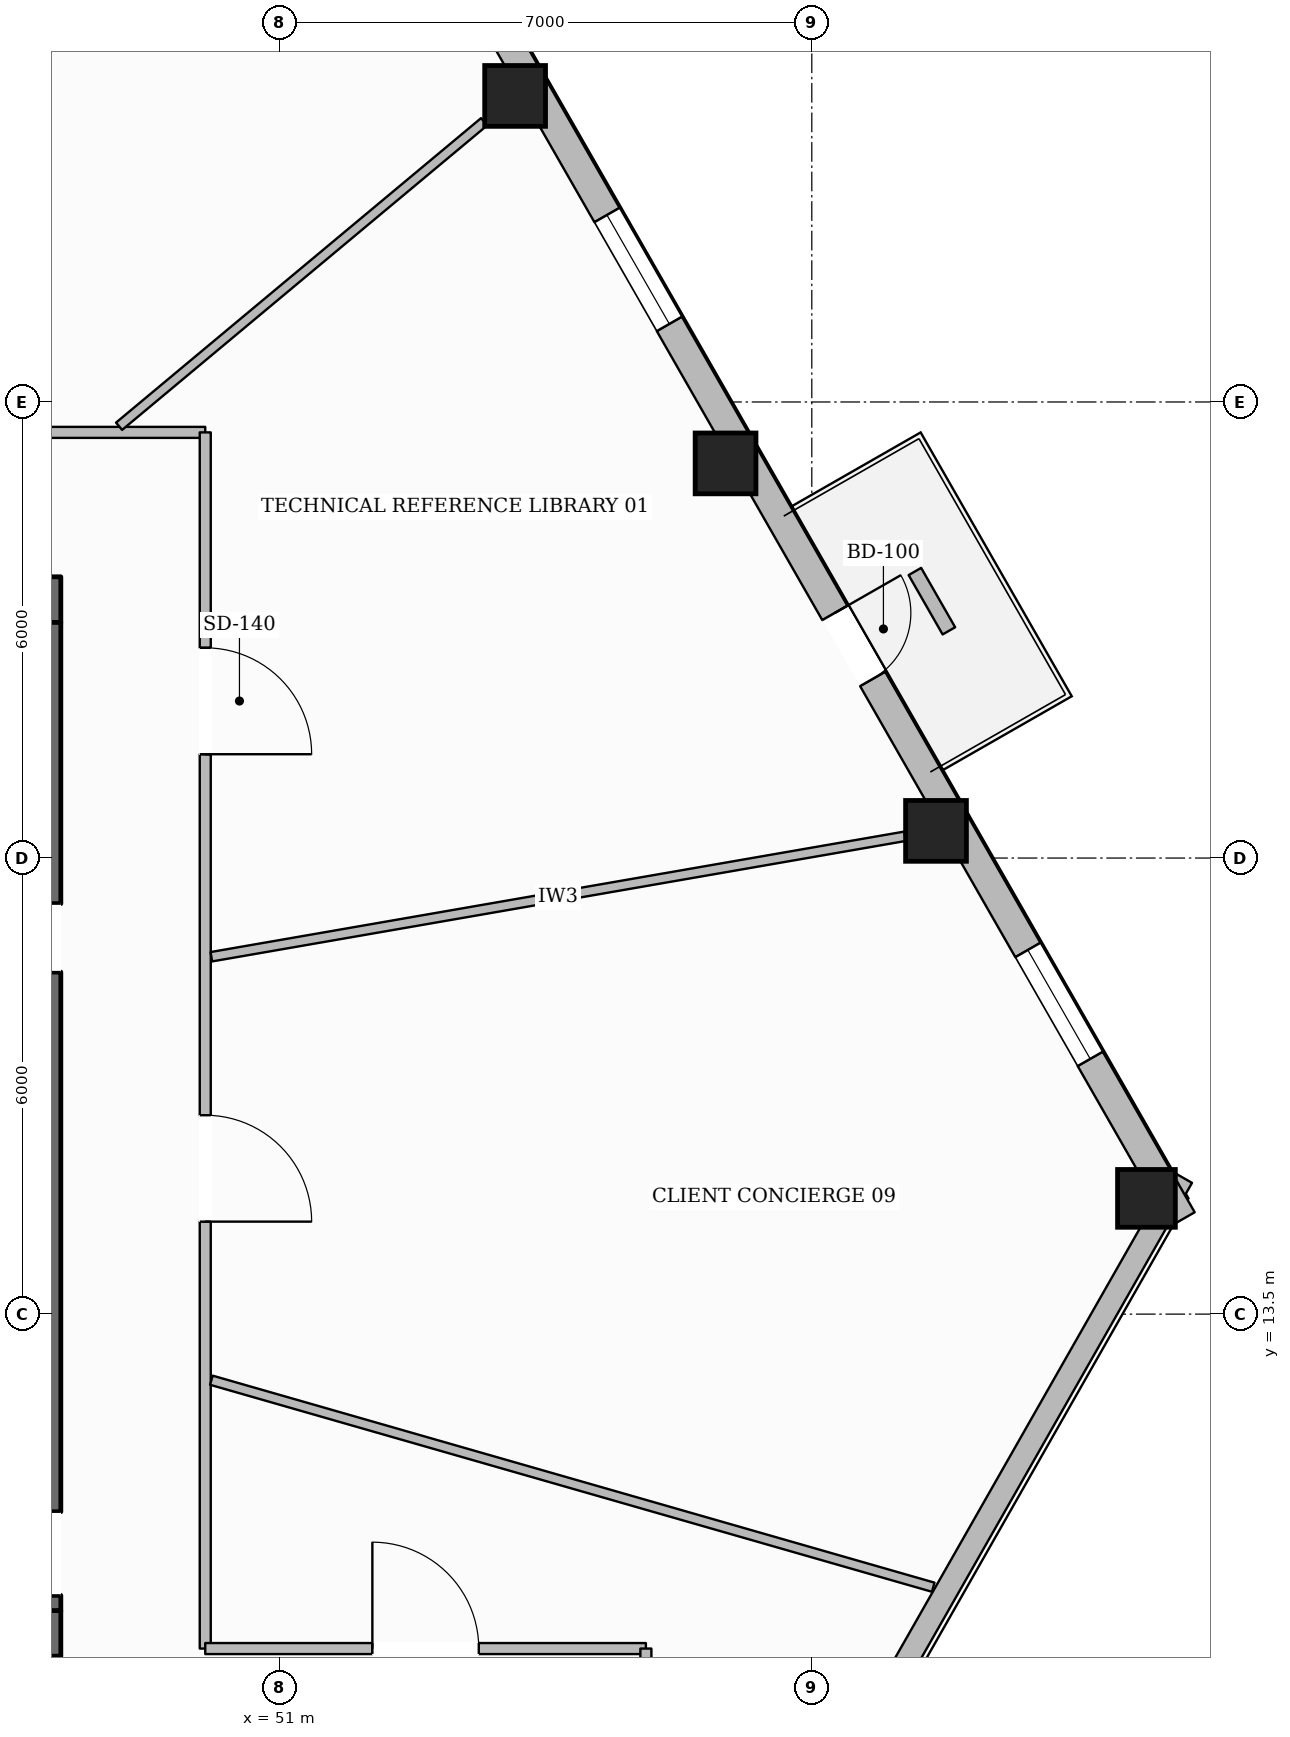
"""IFC4 building model, lengths in metres.
Left out: names, types, materials, properties, quantities, classifications, styles, units other than length and angle.
Written with IfcOpenShell. Run it as: python <this file> out.ifc"""

import sys

from ifc_helpers import new_model, si_unit, direction, frame, frame_2d, origin, origin_2d, place, context, subcontext, project, spatial, rectangle, hollow_rectangle, extrude, element, fill, save


model = new_model("IFC4")
c1 = context("Model", 3, precision=1e-05, world=origin(), true_north=direction((0.0, 1.0)))
c2 = subcontext(c1, "Body", "Model", "MODEL_VIEW")
j1 = project(units=[si_unit("LENGTHUNIT", "METRE"), si_unit("PLANEANGLEUNIT", "RADIAN")], contexts=[c1])
p1 = place(None, origin())
s1 = spatial("IfcSite", under=j1, at=p1, CompositionType="ELEMENT")
p2 = place(p1, origin())
s2 = spatial("IfcBuilding", under=s1, at=p2, CompositionType="ELEMENT")
p3 = place(p2, frame((0.0, 0.0, 32.95)))
s3 = spatial("IfcBuildingStorey", under=s2, at=p3, CompositionType="ELEMENT", Elevation=32.95)
p4 = place(p3, frame((27.88, 9.3, 0.0), z_axis=(0.0, 0.0, 1.0), x_axis=(1.0, 0.0, 0.0)))
e1 = element("IfcWall", 1, at=p4, inside=s3, PredefinedType="SOLIDWALL", context=c2, shape_type="SweptSolid", body=[
    extrude(rectangle(XDim=20.24, YDim=0.6, at=frame_2d((10.12, 0.0))), origin(), (0.0, 0.0, 1.0), 3.59),
])
p5 = place(p4, frame((10.62, 0.0, 0.0)))
e2 = element("IfcOpeningElement", 2, at=p5, cuts=e1, PredefinedType="OPENING", context=c2, shape_type="SweptSolid", body=[
    extrude(rectangle(XDim=1.4, YDim=2.2, at=frame_2d((0.7, 1.1))), frame((0.0, 0.31, 0.0), z_axis=(0.0, -1.0, 0.0), x_axis=(1.0, 0.0, 0.0)), (0.0, 0.0, 1.0), 0.62),
])
p6 = place(p3, frame((27.88, 22.9, 0.0), z_axis=(0.0, 0.0, 1.0), x_axis=(1.0, 0.0, 0.0)))
e3 = element("IfcWall", 3, at=p6, inside=s3, PredefinedType="SOLIDWALL", context=c2, shape_type="SweptSolid", body=[
    extrude(rectangle(XDim=20.24, YDim=0.6, at=frame_2d((10.12, 0.0))), origin(), (0.0, 0.0, 1.0), 3.59),
])
p7 = place(p6, frame((6.395, 0.0, 0.0)))
e4 = element("IfcOpeningElement", 4, at=p7, cuts=e3, PredefinedType="OPENING", context=c2, shape_type="SweptSolid", body=[
    extrude(rectangle(XDim=1.05, YDim=2.15, at=frame_2d((0.525, 1.075))), frame((0.0, 0.31, 0.0), z_axis=(0.0, -1.0, 0.0), x_axis=(1.0, 0.0, 0.0)), (0.0, 0.0, 1.0), 0.62),
])
p8 = place(p6, frame((12.795, 0.0, 0.0)))
e5 = element("IfcOpeningElement", 5, at=p8, cuts=e3, PredefinedType="OPENING", context=c2, shape_type="SweptSolid", body=[
    extrude(rectangle(XDim=1.05, YDim=2.15, at=frame_2d((0.525, 1.075))), frame((0.0, 0.31, 0.0), z_axis=(0.0, -1.0, 0.0), x_axis=(1.0, 0.0, 0.0)), (0.0, 0.0, 1.0), 0.62),
])
p9 = place(p3, frame((47.82, 9.6, 0.0), z_axis=(0.0, 0.0, 1.0), x_axis=(0.0, 1.0, 0.0)))
e6 = element("IfcWall", 6, at=p9, inside=s3, PredefinedType="SOLIDWALL", context=c2, shape_type="SweptSolid", body=[
    extrude(rectangle(XDim=13.0, YDim=0.6, at=frame_2d((6.5, 0.0))), origin(), (0.0, 0.0, 1.0), 3.59),
])
p10 = place(p9, frame((0.2, 0.0, 0.0)))
e7 = element("IfcOpeningElement", 7, at=p10, cuts=e6, PredefinedType="OPENING", context=c2, shape_type="SweptSolid", body=[
    extrude(rectangle(XDim=1.1, YDim=2.15, at=frame_2d((0.55, 1.075))), frame((0.0, 0.31, 0.0), z_axis=(0.0, -1.0, 0.0), x_axis=(1.0, 0.0, 0.0)), (0.0, 0.0, 1.0), 0.62),
])
p11 = place(p9, frame((8.4, 0.0, 0.0)))
e8 = element("IfcOpeningElement", 8, at=p11, cuts=e6, PredefinedType="OPENING", context=c2, shape_type="SweptSolid", body=[
    extrude(rectangle(XDim=0.9, YDim=2.1, at=frame_2d((0.45, 1.05))), frame((0.0, 0.31, 0.0), z_axis=(0.0, -1.0, 0.0), x_axis=(1.0, 0.0, 0.0)), (0.0, 0.0, 1.0), 0.62),
])
p12 = place(p3, frame((62.403, 15.023, 0.0), z_axis=(0.0, 0.0, 1.0), x_axis=(1.0, 0.0, 0.0)))
e9 = element("IfcColumn", 9, at=p12, inside=s3, PredefinedType="COLUMN", context=c2, shape_type="SweptSolid", body=[
    extrude(hollow_rectangle(XDim=0.76, YDim=0.76, WallThickness=0.035, at=origin_2d()), origin(), (0.0, 0.0, 1.0), 3.59),
])
for number, where, z_axis, x_axis in (
    (10, (59.634, 19.857, 0.0), (0.0, 0.0, 1.0), (1.0, 0.0, 0.0)),
    (11, (56.865, 24.692, 0.0), (0.0, 0.0, 1.0), (1.0, 0.0, 0.0)),
    (12, (54.097, 29.526, 0.0), (0.0, 0.0, 1.0), (1.0, 0.0, 0.0)),
):
    element("IfcColumn", number, at=place(p3, frame(where, z_axis=z_axis, x_axis=x_axis)), inside=s3, PredefinedType="COLUMN", context=c2, shape_type="SweptSolid", body=[
        extrude(hollow_rectangle(XDim=0.8, YDim=0.8, WallThickness=0.036, at=origin_2d()), origin(), (0.0, 0.0, 1.0), 3.59),
    ])
p13 = place(p3, frame((62.872, 15.301, 0.0), z_axis=(0.0, 0.0, 1.0), x_axis=(-0.495028156912, -0.868876932519, 0.0)))
e13 = element("IfcWall", 13, at=p13, inside=s3, PredefinedType="STANDARD", context=c2, shape_type="SweptSolid", body=[
    extrude(rectangle(XDim=16.575, YDim=0.3, at=frame_2d((8.288, 0.0))), origin(), (0.0, 0.0, 1.0), 2.97),
])
p14 = place(p13, frame((7.688, 0.0, 0.65)))
e14 = element("IfcOpeningElement", 14, at=p14, cuts=e13, PredefinedType="OPENING", context=c2, shape_type="SweptSolid", body=[
    extrude(rectangle(XDim=1.2, YDim=1.7, at=frame_2d((0.6, 0.85))), frame((0.0, 0.16, 0.0), z_axis=(0.0, -1.0, 0.0), x_axis=(1.0, 0.0, 0.0)), (0.0, 0.0, 1.0), 0.32),
])
p15 = place(p3, frame((45.788, 44.579, 0.0), z_axis=(0.0, 0.0, 1.0), x_axis=(0.49695855075, -0.867774278736, 0.0)))
e15 = element("IfcWall", 15, at=p15, inside=s3, PredefinedType="STANDARD", context=c2, shape_type="SweptSolid", body=[
    extrude(rectangle(XDim=34.379, YDim=0.38, at=frame_2d((17.189, 0.0))), origin(), (0.0, 0.0, 1.0), 2.97),
])
p16 = place(p15, frame((25.184, 0.0, 0.0)))
e16 = element("IfcOpeningElement", 16, at=p16, cuts=e15, PredefinedType="OPENING", context=c2, shape_type="SweptSolid", body=[
    extrude(rectangle(XDim=1.0, YDim=2.2, at=frame_2d((0.5, 1.1))), frame((0.0, 0.2, 0.0), z_axis=(0.0, -1.0, 0.0), x_axis=(1.0, 0.0, 0.0)), (0.0, 0.0, 1.0), 0.4),
])
p17 = place(p15, frame((30.294, 0.0, 0.65)))
e17 = element("IfcOpeningElement", 17, at=p17, cuts=e15, PredefinedType="OPENING", context=c2, shape_type="SweptSolid", body=[
    extrude(rectangle(XDim=1.65, YDim=1.75, at=frame_2d((0.825, 0.875))), frame((0.0, 0.2, 0.0), z_axis=(0.0, -1.0, 0.0), x_axis=(1.0, 0.0, 0.0)), (0.0, 0.0, 1.0), 0.4),
])
p18 = place(p15, frame((19.152, 0.0, 0.65)))
e18 = element("IfcOpeningElement", 18, at=p18, cuts=e15, PredefinedType="OPENING", context=c2, shape_type="SweptSolid", body=[
    extrude(rectangle(XDim=1.65, YDim=1.75, at=frame_2d((0.825, 0.875))), frame((0.0, 0.2, 0.0), z_axis=(0.0, -1.0, 0.0), x_axis=(1.0, 0.0, 0.0)), (0.0, 0.0, 1.0), 0.4),
])
p19 = place(p15, frame((8.01, 0.0, 0.65)))
e19 = element("IfcOpeningElement", 19, at=p19, cuts=e15, PredefinedType="OPENING", context=c2, shape_type="SweptSolid", body=[
    extrude(rectangle(XDim=1.65, YDim=1.75, at=frame_2d((0.825, 0.875))), frame((0.0, 0.2, 0.0), z_axis=(0.0, -1.0, 0.0), x_axis=(1.0, 0.0, 0.0)), (0.0, 0.0, 1.0), 0.4),
])
p20 = place(p15, frame((2.438, 0.0, 0.65)))
e20 = element("IfcOpeningElement", 20, at=p20, cuts=e15, PredefinedType="OPENING", context=c2, shape_type="SweptSolid", body=[
    extrude(rectangle(XDim=1.65, YDim=1.75, at=frame_2d((0.825, 0.875))), frame((0.0, 0.2, 0.0), z_axis=(0.0, -1.0, 0.0), x_axis=(1.0, 0.0, 0.0)), (0.0, 0.0, 1.0), 0.4),
])
p21 = place(p3, frame((59.804, 22.489, 0.0), z_axis=(0.0, 0.0, 1.0), x_axis=(-0.497160915336, 0.867658356879, 0.0)))
e21 = element("IfcWall", 21, at=p21, inside=s3, PredefinedType="USERDEFINED", context=c2, shape_type="SweptSolid", body=[
    extrude(rectangle(XDim=0.9, YDim=0.19, at=frame_2d((0.45, 0.0))), origin(), (0.0, 0.0, 1.0), 0.5),
])
p22 = place(p3, frame((39.0, 25.1, 0.0), z_axis=(0.0, 0.0, 1.0), x_axis=(1.0, 0.0, 0.0)))
e22 = element("IfcWall", 22, at=p22, inside=s3, PredefinedType="PARTITIONING", context=c2, shape_type="SweptSolid", body=[
    extrude(rectangle(XDim=11.02, YDim=0.145, at=frame_2d((5.51, 0.0))), origin(), (0.0, 0.0, 1.0), 3.59),
])
p23 = place(p22, frame((4.959, 0.0, 0.0)))
e23 = element("IfcOpeningElement", 23, at=p23, cuts=e22, PredefinedType="OPENING", context=c2, shape_type="SweptSolid", body=[
    extrude(rectangle(XDim=1.4, YDim=2.2, at=frame_2d((0.7, 1.1))), frame((0.0, 0.083, 0.0), z_axis=(0.0, -1.0, 0.0), x_axis=(1.0, 0.0, 0.0)), (0.0, 0.0, 1.0), 0.165),
])
p24 = place(p3, frame((50.02, 25.1, 0.0), z_axis=(0.0, 0.0, 1.0), x_axis=(0.0, -1.0, 0.0)))
e24 = element("IfcWall", 24, at=p24, inside=s3, PredefinedType="PARTITIONING", context=c2, shape_type="SweptSolid", body=[
    extrude(rectangle(XDim=16.0, YDim=0.145, at=frame_2d((8.0, 0.0))), origin(), (0.0, 0.0, 1.0), 3.278),
])
p25 = place(p24, frame((2.834, 0.0, 0.0)))
e25 = element("IfcOpeningElement", 25, at=p25, cuts=e24, PredefinedType="OPENING", context=c2, shape_type="SweptSolid", body=[
    extrude(rectangle(XDim=1.4, YDim=2.2, at=frame_2d((0.7, 1.1))), frame((0.0, 0.083, 0.0), z_axis=(0.0, -1.0, 0.0), x_axis=(1.0, 0.0, 0.0)), (0.0, 0.0, 1.0), 0.165),
])
p26 = place(p24, frame((8.983, 0.0, 0.0)))
e26 = element("IfcOpeningElement", 26, at=p26, cuts=e24, PredefinedType="OPENING", context=c2, shape_type="SweptSolid", body=[
    extrude(rectangle(XDim=1.4, YDim=2.2, at=frame_2d((0.7, 1.1))), frame((0.0, 0.083, 0.0), z_axis=(0.0, -1.0, 0.0), x_axis=(1.0, 0.0, 0.0)), (0.0, 0.0, 1.0), 0.165),
])
p27 = place(p3, frame((50.02, 9.1, 0.0), z_axis=(0.0, 0.0, 1.0), x_axis=(1.0, 0.0, 0.0)))
e27 = element("IfcWall", 27, at=p27, inside=s3, PredefinedType="PARTITIONING", context=c2, shape_type="SweptSolid", body=[
    extrude(rectangle(XDim=5.797, YDim=0.145, at=frame_2d((2.898, 0.0))), origin(), (0.0, 0.0, 1.0), 3.59),
])
p28 = place(p27, frame((2.198, 0.0, 0.0)))
e28 = element("IfcOpeningElement", 28, at=p28, cuts=e27, PredefinedType="OPENING", context=c2, shape_type="SweptSolid", body=[
    extrude(rectangle(XDim=1.4, YDim=2.2, at=frame_2d((0.7, 1.1))), frame((0.0, 0.083, 0.0), z_axis=(0.0, -1.0, 0.0), x_axis=(1.0, 0.0, 0.0)), (0.0, 0.0, 1.0), 0.165),
])
p29 = place(p3, frame((55.817, 9.1, 0.0), z_axis=(0.0, 0.0, 1.0), x_axis=(0.0, -1.0, 0.0)))
e29 = element("IfcWall", 29, at=p29, inside=s3, PredefinedType="PARTITIONING", context=c2, shape_type="SweptSolid", body=[
    extrude(rectangle(XDim=2.0, YDim=0.145, at=frame_2d((1.0, 0.0))), origin(), (0.0, 0.0, 1.0), 3.59),
])
p30 = place(p3, frame((50.101, 18.202, 0.0), z_axis=(0.0, 0.0, 1.0), x_axis=(0.985253321199, 0.171101996091, 0.0)))
e30 = element("IfcWall", 30, at=p30, inside=s3, PredefinedType="PARTITIONING", context=c2, shape_type="SweptSolid", body=[
    extrude(rectangle(XDim=9.262, YDim=0.125, at=frame_2d((4.631, 0.0))), origin(), (0.0, 0.0, 1.0), 3.057),
])
p31 = place(p3, frame((48.886, 25.18, 0.0), z_axis=(0.0, 0.0, 1.0), x_axis=(0.767926794533, 0.640537616568, 0.0)))
e31 = element("IfcWall", 31, at=p31, inside=s3, PredefinedType="PARTITIONING", context=c2, shape_type="SweptSolid", body=[
    extrude(rectangle(XDim=6.253, YDim=0.125, at=frame_2d((3.127, 0.0))), origin(), (0.0, 0.0, 1.0), 3.057),
])
p32 = place(p3, frame((50.101, 12.63, 0.0), z_axis=(0.0, 0.0, 1.0), x_axis=(0.961255860269, -0.275657706401, 0.0)))
e32 = element("IfcWall", 32, at=p32, inside=s3, PredefinedType="PARTITIONING", context=c2, shape_type="SweptSolid", body=[
    extrude(rectangle(XDim=9.88, YDim=0.125, at=frame_2d((4.94, 0.0))), origin(), (0.0, 0.0, 1.0), 3.59),
])
p33 = place(p16, origin())
e33 = element("IfcDoor", 33, at=p33, inside=s3, OperationType="SINGLE_SWING_LEFT", PredefinedType="DOOR", context=c2, shape_type="SweptSolid", body=[
    extrude(rectangle(XDim=1.0, YDim=2.2, at=frame_2d((0.5, 1.1))), frame((0.0, 0.025, 0.0), z_axis=(0.0, -1.0, 0.0), x_axis=(1.0, 0.0, 0.0)), (0.0, 0.0, 1.0), 0.05),
])
fill(e16, e33)
p34 = place(p17, origin())
e34 = element("IfcWindow", 34, at=p34, inside=s3, PartitioningType="SINGLE_PANEL", PredefinedType="WINDOW", context=c2, shape_type="SweptSolid", body=[
    extrude(rectangle(XDim=1.65, YDim=1.75, at=frame_2d((0.825, 0.875))), frame((0.0, 0.03, 0.0), z_axis=(0.0, -1.0, 0.0), x_axis=(1.0, 0.0, 0.0)), (0.0, 0.0, 1.0), 0.06),
])
fill(e17, e34)
p35 = place(p18, origin())
e35 = element("IfcWindow", 35, at=p35, inside=s3, PartitioningType="SINGLE_PANEL", PredefinedType="WINDOW", context=c2, shape_type="SweptSolid", body=[
    extrude(rectangle(XDim=1.65, YDim=1.75, at=frame_2d((0.825, 0.875))), frame((0.0, 0.03, 0.0), z_axis=(0.0, -1.0, 0.0), x_axis=(1.0, 0.0, 0.0)), (0.0, 0.0, 1.0), 0.06),
])
fill(e18, e35)
p36 = place(p25, origin())
e36 = element("IfcDoor", 36, at=p36, inside=s3, OperationType="SINGLE_SWING_RIGHT", PredefinedType="DOOR", context=c2, shape_type="SweptSolid", body=[
    extrude(rectangle(XDim=1.4, YDim=2.2, at=frame_2d((0.7, 1.1))), frame((0.0, 0.025, 0.0), z_axis=(0.0, -1.0, 0.0), x_axis=(1.0, 0.0, 0.0)), (0.0, 0.0, 1.0), 0.05),
])
fill(e25, e36)
p37 = place(p28, origin())
e37 = element("IfcDoor", 37, at=p37, inside=s3, OperationType="SINGLE_SWING_LEFT", PredefinedType="DOOR", context=c2, shape_type="SweptSolid", body=[
    extrude(rectangle(XDim=1.4, YDim=2.2, at=frame_2d((0.7, 1.1))), frame((0.0, 0.025, 0.0), z_axis=(0.0, -1.0, 0.0), x_axis=(1.0, 0.0, 0.0)), (0.0, 0.0, 1.0), 0.05),
])
fill(e28, e37)
p38 = place(p26, origin())
e38 = element("IfcDoor", 38, at=p38, inside=s3, OperationType="SINGLE_SWING_RIGHT", PredefinedType="DOOR", context=c2, shape_type="SweptSolid", body=[
    extrude(rectangle(XDim=1.4, YDim=2.2, at=frame_2d((0.7, 1.1))), frame((0.0, 0.025, 0.0), z_axis=(0.0, -1.0, 0.0), x_axis=(1.0, 0.0, 0.0)), (0.0, 0.0, 1.0), 0.05),
])
fill(e26, e38)
save(model, sys.argv[1])
